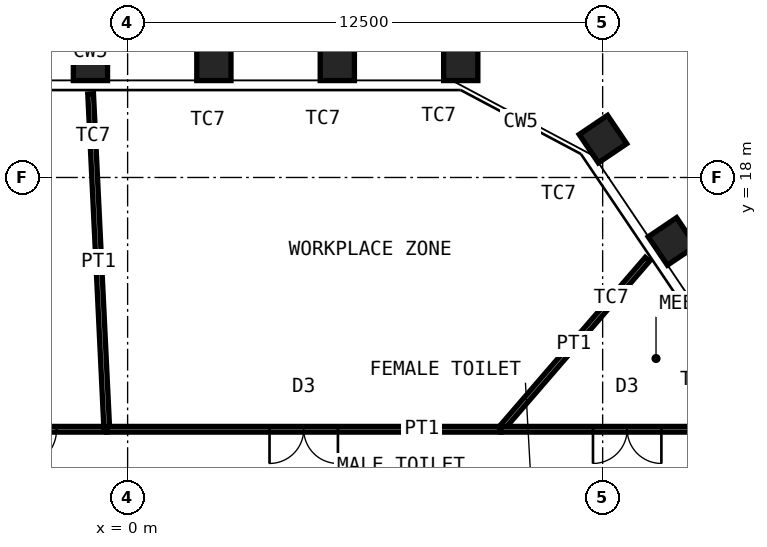
"""IFC4 building model, lengths in metres.
Left out: names, types, materials, properties, quantities, classifications, styles, units other than length and angle.
Written with IfcOpenShell. Run it as: python <this file> out.ifc"""

import sys

from ifc_helpers import new_model, si_unit, direction, frame, frame_2d, origin, origin_2d, place, context, subcontext, project, spatial, rectangle, hollow_rectangle, extrude, element, fill, save


model = new_model("IFC4")
c1 = context("Model", 3, precision=1e-05, world=origin(), true_north=direction((0.0, 1.0)))
c2 = subcontext(c1, "Body", "Model", "MODEL_VIEW")
j1 = project(units=[si_unit("LENGTHUNIT", "METRE"), si_unit("PLANEANGLEUNIT", "RADIAN")], contexts=[c1])
p1 = place(None, origin())
s1 = spatial("IfcSite", under=j1, at=p1, CompositionType="ELEMENT")
p2 = place(p1, origin())
s2 = spatial("IfcBuilding", under=s1, at=p2, CompositionType="ELEMENT")
p3 = place(p2, frame((0.0, 0.0, 266.2)))
s3 = spatial("IfcBuildingStorey", under=s2, at=p3, CompositionType="ELEMENT", Elevation=266.2)
for number, where, z_axis, x_axis in (
    (1, (-0.978, 21.0, 0.0), (0.0, 0.0, 1.0), (-1.0, 0.0, 0.0)),
    (2, (2.27, 21.0, 0.0), (0.0, 0.0, 1.0), (-1.0, 0.0, 0.0)),
    (3, (5.518, 21.0, 0.0), (0.0, 0.0, 1.0), (-1.0, 0.0, 0.0)),
    (4, (8.766, 21.0, 0.0), (0.0, 0.0, 1.0), (-1.0, 0.0, 0.0)),
    (5, (12.508, 19.01, 0.0), (0.0, 0.0, 1.0), (-0.559, 0.829, 0.0)),
    (6, (14.324, 16.318, 0.0), (0.0, 0.0, 1.0), (-0.559, 0.829, 0.0)),
):
    element("IfcColumn", number, at=place(p3, frame(where, z_axis=z_axis, x_axis=x_axis)), inside=s3, PredefinedType="COLUMN", context=c2, shape_type="SweptSolid", body=[
        extrude(hollow_rectangle(XDim=0.9, YDim=0.9, WallThickness=0.06, at=origin_2d()), origin(), (0.0, 0.0, 1.0), 4.2),
    ])
p4 = place(p3, frame((-4.188, 11.375, 0.0), z_axis=(0.0, 0.0, 1.0), x_axis=(1.0, 0.0, 0.0)))
e7 = element("IfcWall", 7, at=p4, inside=s3, PredefinedType="PARTITIONING", context=c2, shape_type="SweptSolid", body=[
    extrude(rectangle(XDim=3.64, YDim=0.15, at=frame_2d((1.82, 0.0))), origin(), (0.0, 0.0, 1.0), 4.03),
])
p5 = place(p4, frame((1.32, 0.0, 0.0)))
e8 = element("IfcOpeningElement", 8, at=p5, cuts=e7, PredefinedType="OPENING", context=c2, shape_type="SweptSolid", body=[
    extrude(rectangle(XDim=1.0, YDim=2.4, at=frame_2d((0.5, 1.2))), frame((0.0, 0.085, 0.0), z_axis=(0.0, -1.0, 0.0), x_axis=(1.0, 0.0, 0.0)), (0.0, 0.0, 1.0), 0.17),
])
p6 = place(p3, frame((-0.973, 20.2, 0.0), z_axis=(0.0, 0.0, 1.0), x_axis=(0.048134910622, -0.998840843368, 0.0)))
e9 = element("IfcWall", 9, at=p6, inside=s3, PredefinedType="PARTITIONING", context=c2, shape_type="SweptSolid", body=[
    extrude(rectangle(XDim=8.835, YDim=0.15, at=frame_2d((4.418, 0.0))), origin(), (0.0, 0.0, 1.0), 3.33),
])
p7 = place(p3, frame((-0.548, 11.375, 0.0), z_axis=(0.0, 0.0, 1.0), x_axis=(1.0, 0.0, 0.0)))
e10 = element("IfcWall", 10, at=p7, inside=s3, PredefinedType="PARTITIONING", context=c2, shape_type="SweptSolid", body=[
    extrude(rectangle(XDim=10.365, YDim=0.15, at=frame_2d((5.182, 0.0))), origin(), (0.0, 0.0, 1.0), 4.03),
])
p8 = place(p7, frame((4.282, 0.0, 0.0)))
e11 = element("IfcOpeningElement", 11, at=p8, cuts=e10, PredefinedType="OPENING", context=c2, shape_type="SweptSolid", body=[
    extrude(rectangle(XDim=1.8, YDim=2.4, at=frame_2d((0.9, 1.2))), frame((0.0, 0.085, 0.0), z_axis=(0.0, -1.0, 0.0), x_axis=(1.0, 0.0, 0.0)), (0.0, 0.0, 1.0), 0.17),
])
p9 = place(p3, frame((13.678, 15.85, 0.0), z_axis=(0.0, 0.0, 1.0), x_axis=(-0.653328423077, -0.757074614288, 0.0)))
e12 = element("IfcWall", 12, at=p9, inside=s3, PredefinedType="PARTITIONING", context=c2, shape_type="SweptSolid", body=[
    extrude(rectangle(XDim=5.911, YDim=0.15, at=frame_2d((2.956, 0.0))), origin(), (0.0, 0.0, 1.0), 3.33),
])
p10 = place(p3, frame((9.816, 11.375, 0.0), z_axis=(0.0, 0.0, 1.0), x_axis=(1.0, 0.0, 0.0)))
e13 = element("IfcWall", 13, at=p10, inside=s3, PredefinedType="PARTITIONING", context=c2, shape_type="SweptSolid", body=[
    extrude(rectangle(XDim=6.659, YDim=0.15, at=frame_2d((3.329, 0.0))), origin(), (0.0, 0.0, 1.0), 4.03),
])
p11 = place(p10, frame((2.429, 0.0, 0.0)))
e14 = element("IfcOpeningElement", 14, at=p11, cuts=e13, PredefinedType="OPENING", context=c2, shape_type="SweptSolid", body=[
    extrude(rectangle(XDim=1.8, YDim=2.4, at=frame_2d((0.9, 1.2))), frame((0.0, 0.085, 0.0), z_axis=(0.0, -1.0, 0.0), x_axis=(1.0, 0.0, 0.0)), (0.0, 0.0, 1.0), 0.17),
])
p12 = place(p5, origin())
e15 = element("IfcDoor", 15, at=p12, inside=s3, OperationType="SINGLE_SWING_LEFT", PredefinedType="DOOR", context=c2, shape_type="SweptSolid", body=[
    extrude(rectangle(XDim=1.0, YDim=2.4, at=frame_2d((0.5, 1.2))), frame((0.0, 0.025, 0.0), z_axis=(0.0, -1.0, 0.0), x_axis=(1.0, 0.0, 0.0)), (0.0, 0.0, 1.0), 0.05),
])
fill(e8, e15)
p13 = place(p8, origin())
e16 = element("IfcDoor", 16, at=p13, inside=s3, OperationType="DOUBLE_DOOR_DOUBLE_SWING", PredefinedType="DOOR", context=c2, shape_type="SweptSolid", body=[
    extrude(rectangle(XDim=1.8, YDim=2.4, at=frame_2d((0.9, 1.2))), frame((0.0, 0.025, 0.0), z_axis=(0.0, -1.0, 0.0), x_axis=(1.0, 0.0, 0.0)), (0.0, 0.0, 1.0), 0.05),
])
fill(e11, e16)
p14 = place(p11, origin())
e17 = element("IfcDoor", 17, at=p14, inside=s3, OperationType="DOUBLE_DOOR_DOUBLE_SWING", PredefinedType="DOOR", context=c2, shape_type="SweptSolid", body=[
    extrude(rectangle(XDim=1.8, YDim=2.4, at=frame_2d((0.9, 1.2))), frame((0.0, 0.025, 0.0), z_axis=(0.0, -1.0, 0.0), x_axis=(1.0, 0.0, 0.0)), (0.0, 0.0, 1.0), 0.05),
])
fill(e14, e17)
save(model, sys.argv[1])
